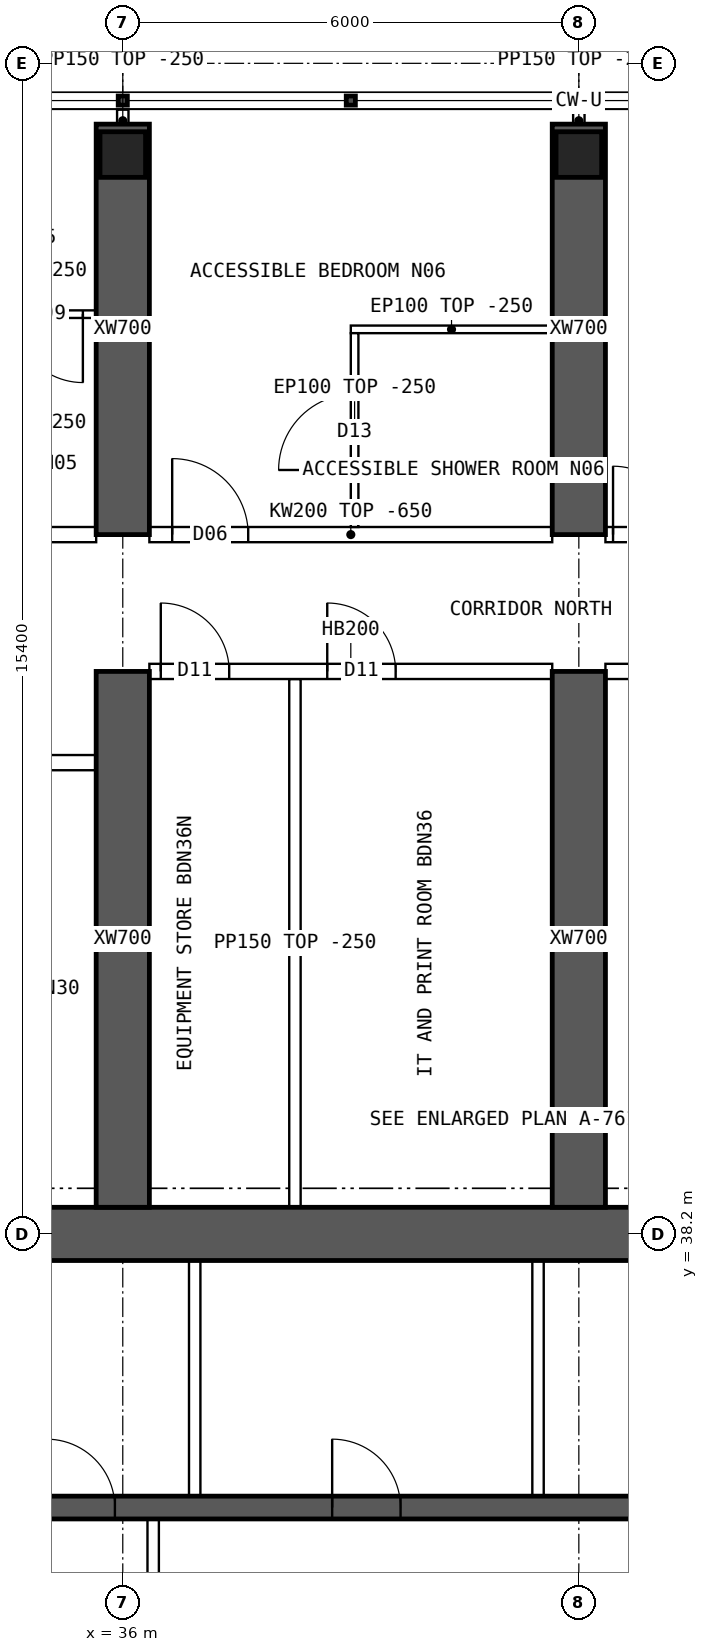
"""IFC4 building model, lengths in metres.
Left out: names, types, materials, properties, quantities, classifications, styles, units other than length and angle.
Written with IfcOpenShell. Run it as: python <this file> out.ifc"""

import sys

from ifc_helpers import new_model, si_unit, direction, frame, frame_2d, origin, origin_2d, place, context, subcontext, project, spatial, polyline, rectangle, hollow_rectangle, outline, extrude, element, fill, save


model = new_model("IFC4")
c1 = context("Model", 3, precision=1e-05, world=origin(), true_north=direction((0.0, 1.0)))
c2 = subcontext(c1, "Body", "Model", "MODEL_VIEW")
j1 = project(units=[si_unit("LENGTHUNIT", "METRE"), si_unit("PLANEANGLEUNIT", "RADIAN")], contexts=[c1])
p1 = place(None, origin())
s1 = spatial("IfcSite", under=j1, at=p1, CompositionType="ELEMENT")
p2 = place(p1, origin())
s2 = spatial("IfcBuilding", under=s1, at=p2, CompositionType="ELEMENT")
p3 = place(p2, frame((0.0, 0.0, 235.3)))
s3 = spatial("IfcBuildingStorey", under=s2, at=p3, CompositionType="ELEMENT", Elevation=235.3)
for number, where, z_axis, x_axis in (
    (1, (36.0, 52.4, 0.0), (0.0, 0.0, 1.0), (1.0, 0.0, 0.0)),
    (2, (42.0, 52.4, 0.0), (0.0, 0.0, 1.0), (1.0, 0.0, 0.0)),
):
    element("IfcColumn", number, at=place(p3, frame(where, z_axis=z_axis, x_axis=x_axis)), inside=s3, PredefinedType="COLUMN", context=c2, shape_type="SweptSolid", body=[
        extrude(hollow_rectangle(XDim=0.6, YDim=0.6, WallThickness=0.06, at=origin_2d()), origin(), (0.0, 0.0, 1.0), 3.75),
    ])
p4 = place(p3, frame((18.0, 38.2, 0.0), z_axis=(0.0, 0.0, 1.0), x_axis=(1.0, 0.0, 0.0)))
e3 = element("IfcWall", 3, at=p4, inside=s3, PredefinedType="SHEAR", context=c2, shape_type="SweptSolid", body=[
    extrude(rectangle(XDim=48.0, YDim=0.7, at=frame_2d((24.0, 0.0))), origin(), (0.0, 0.0, 1.0), 3.75),
])
p5 = place(p3, frame((18.35, 34.6, 0.0), z_axis=(0.0, 0.0, 1.0), x_axis=(1.0, 0.0, 0.0)))
e4 = element("IfcWall", 4, at=p5, inside=s3, PredefinedType="SHEAR", context=c2, shape_type="SweptSolid", body=[
    extrude(rectangle(XDim=47.3, YDim=0.3, at=frame_2d((23.65, 0.0))), origin(), (0.0, 0.0, 1.0), 3.75),
])
p6 = place(p5, frame((0.9, 0.0, 0.0)))
e5 = element("IfcOpeningElement", 5, at=p6, cuts=e4, PredefinedType="OPENING", context=c2, shape_type="SweptSolid", body=[
    extrude(rectangle(XDim=1.1, YDim=2.1, at=frame_2d((0.55, 1.05))), frame((0.0, 0.16, 0.0), z_axis=(0.0, -1.0, 0.0), x_axis=(1.0, 0.0, 0.0)), (0.0, 0.0, 1.0), 0.32),
])
p7 = place(p5, frame((45.3, 0.0, 0.0)))
e6 = element("IfcOpeningElement", 6, at=p7, cuts=e4, PredefinedType="OPENING", context=c2, shape_type="SweptSolid", body=[
    extrude(rectangle(XDim=1.1, YDim=2.1, at=frame_2d((0.55, 1.05))), frame((0.0, 0.16, 0.0), z_axis=(0.0, -1.0, 0.0), x_axis=(1.0, 0.0, 0.0)), (0.0, 0.0, 1.0), 0.32),
])
p8 = place(p5, frame((4.25, 0.0, 0.0)))
e7 = element("IfcOpeningElement", 7, at=p8, cuts=e4, PredefinedType="OPENING", context=c2, shape_type="SweptSolid", body=[
    extrude(rectangle(XDim=0.9, YDim=2.1, at=frame_2d((0.45, 1.05))), frame((0.0, 0.16, 0.0), z_axis=(0.0, -1.0, 0.0), x_axis=(1.0, 0.0, 0.0)), (0.0, 0.0, 1.0), 0.32),
])
p9 = place(p5, frame((42.15, 0.0, 0.0)))
e8 = element("IfcOpeningElement", 8, at=p9, cuts=e4, PredefinedType="OPENING", context=c2, shape_type="SweptSolid", body=[
    extrude(rectangle(XDim=0.9, YDim=2.1, at=frame_2d((0.45, 1.05))), frame((0.0, 0.16, 0.0), z_axis=(0.0, -1.0, 0.0), x_axis=(1.0, 0.0, 0.0)), (0.0, 0.0, 1.0), 0.32),
])
p10 = place(p5, frame((9.025, 0.0, 0.0)))
e9 = element("IfcOpeningElement", 9, at=p10, cuts=e4, PredefinedType="OPENING", context=c2, shape_type="SweptSolid", body=[
    extrude(rectangle(XDim=0.9, YDim=2.1, at=frame_2d((0.45, 1.05))), frame((0.0, 0.16, 0.0), z_axis=(0.0, -1.0, 0.0), x_axis=(1.0, 0.0, 0.0)), (0.0, 0.0, 1.0), 0.32),
])
p11 = place(p5, frame((12.999, 0.0, 0.0)))
e10 = element("IfcOpeningElement", 10, at=p11, cuts=e4, PredefinedType="OPENING", context=c2, shape_type="SweptSolid", body=[
    extrude(rectangle(XDim=0.9, YDim=2.1, at=frame_2d((0.45, 1.05))), frame((0.0, 0.16, 0.0), z_axis=(0.0, -1.0, 0.0), x_axis=(1.0, 0.0, 0.0)), (0.0, 0.0, 1.0), 0.32),
])
p12 = place(p5, frame((16.646, 0.0, 0.0)))
e11 = element("IfcOpeningElement", 11, at=p12, cuts=e4, PredefinedType="OPENING", context=c2, shape_type="SweptSolid", body=[
    extrude(rectangle(XDim=0.9, YDim=2.1, at=frame_2d((0.45, 1.05))), frame((0.0, 0.16, 0.0), z_axis=(0.0, -1.0, 0.0), x_axis=(1.0, 0.0, 0.0)), (0.0, 0.0, 1.0), 0.32),
])
p13 = place(p5, frame((20.405, 0.0, 0.0)))
e12 = element("IfcOpeningElement", 12, at=p13, cuts=e4, PredefinedType="OPENING", context=c2, shape_type="SweptSolid", body=[
    extrude(rectangle(XDim=0.9, YDim=2.1, at=frame_2d((0.45, 1.05))), frame((0.0, 0.16, 0.0), z_axis=(0.0, -1.0, 0.0), x_axis=(1.0, 0.0, 0.0)), (0.0, 0.0, 1.0), 0.32),
])
p14 = place(p5, frame((24.811, 0.0, 0.0)))
e13 = element("IfcOpeningElement", 13, at=p14, cuts=e4, PredefinedType="OPENING", context=c2, shape_type="SweptSolid", body=[
    extrude(rectangle(XDim=0.9, YDim=2.1, at=frame_2d((0.45, 1.05))), frame((0.0, 0.16, 0.0), z_axis=(0.0, -1.0, 0.0), x_axis=(1.0, 0.0, 0.0)), (0.0, 0.0, 1.0), 0.32),
])
p15 = place(p5, frame((27.608, 0.0, 0.0)))
e14 = element("IfcOpeningElement", 14, at=p15, cuts=e4, PredefinedType="OPENING", context=c2, shape_type="SweptSolid", body=[
    extrude(rectangle(XDim=0.9, YDim=2.1, at=frame_2d((0.45, 1.05))), frame((0.0, 0.16, 0.0), z_axis=(0.0, -1.0, 0.0), x_axis=(1.0, 0.0, 0.0)), (0.0, 0.0, 1.0), 0.32),
])
p16 = place(p5, frame((30.791, 0.0, 0.0)))
e15 = element("IfcOpeningElement", 15, at=p16, cuts=e4, PredefinedType="OPENING", context=c2, shape_type="SweptSolid", body=[
    extrude(rectangle(XDim=0.9, YDim=2.1, at=frame_2d((0.45, 1.05))), frame((0.0, 0.16, 0.0), z_axis=(0.0, -1.0, 0.0), x_axis=(1.0, 0.0, 0.0)), (0.0, 0.0, 1.0), 0.32),
])
p17 = place(p5, frame((34.742, 0.0, 0.0)))
e16 = element("IfcOpeningElement", 16, at=p17, cuts=e4, PredefinedType="OPENING", context=c2, shape_type="SweptSolid", body=[
    extrude(rectangle(XDim=0.9, YDim=2.1, at=frame_2d((0.45, 1.05))), frame((0.0, 0.16, 0.0), z_axis=(0.0, -1.0, 0.0), x_axis=(1.0, 0.0, 0.0)), (0.0, 0.0, 1.0), 0.32),
])
p18 = place(p5, frame((37.68, 0.0, 0.0)))
e17 = element("IfcOpeningElement", 17, at=p18, cuts=e4, PredefinedType="OPENING", context=c2, shape_type="SweptSolid", body=[
    extrude(rectangle(XDim=0.9, YDim=2.1, at=frame_2d((0.45, 1.05))), frame((0.0, 0.16, 0.0), z_axis=(0.0, -1.0, 0.0), x_axis=(1.0, 0.0, 0.0)), (0.0, 0.0, 1.0), 0.32),
])
p19 = place(p3, frame((36.0, 47.4, 0.0), z_axis=(0.0, 0.0, 1.0), x_axis=(0.0, 1.0, 0.0)))
e18 = element("IfcWall", 18, at=p19, inside=s3, PredefinedType="SHEAR", context=c2, shape_type="SweptSolid", body=[
    extrude(rectangle(XDim=5.4, YDim=0.7, at=frame_2d((2.7, 0.0))), origin(), (0.0, 0.0, 1.0), 3.75),
])
p20 = place(p3, frame((36.0, 38.55, 0.0), z_axis=(0.0, 0.0, 1.0), x_axis=(0.0, 1.0, 0.0)))
e19 = element("IfcWall", 19, at=p20, inside=s3, PredefinedType="SHEAR", context=c2, shape_type="SweptSolid", body=[
    extrude(rectangle(XDim=7.05, YDim=0.7, at=frame_2d((3.525, 0.0))), origin(), (0.0, 0.0, 1.0), 3.75),
])
p21 = place(p3, frame((42.0, 47.4, 0.0), z_axis=(0.0, 0.0, 1.0), x_axis=(0.0, 1.0, 0.0)))
e20 = element("IfcWall", 20, at=p21, inside=s3, PredefinedType="SHEAR", context=c2, shape_type="SweptSolid", body=[
    extrude(rectangle(XDim=5.4, YDim=0.7, at=frame_2d((2.7, 0.0))), origin(), (0.0, 0.0, 1.0), 3.75),
])
p22 = place(p3, frame((42.0, 38.55, 0.0), z_axis=(0.0, 0.0, 1.0), x_axis=(0.0, 1.0, 0.0)))
e21 = element("IfcWall", 21, at=p22, inside=s3, PredefinedType="SHEAR", context=c2, shape_type="SweptSolid", body=[
    extrude(rectangle(XDim=7.05, YDim=0.7, at=frame_2d((3.525, 0.0))), origin(), (0.0, 0.0, 1.0), 3.75),
])
p23 = place(p3, frame((36.4, 30.55, 0.0), z_axis=(0.0, 0.0, 1.0), x_axis=(0.0, 1.0, 0.0)))
e22 = element("IfcWall", 22, at=p23, inside=s3, PredefinedType="SOLIDWALL", context=c2, shape_type="SweptSolid", body=[
    extrude(rectangle(XDim=3.9, YDim=0.15, at=frame_2d((1.95, 0.0))), origin(), (0.0, 0.0, 1.0), 3.5),
])
p24 = place(p23, frame((1.15, 0.0, 0.0)))
e23 = element("IfcOpeningElement", 23, at=p24, cuts=e22, PredefinedType="OPENING", context=c2, shape_type="SweptSolid", body=[
    extrude(rectangle(XDim=1.6, YDim=2.1, at=frame_2d((0.8, 1.05))), frame((0.0, 0.085, 0.0), z_axis=(0.0, -1.0, 0.0), x_axis=(1.0, 0.0, 0.0)), (0.0, 0.0, 1.0), 0.17),
])
for number, where, z_axis, x_axis in (
    (24, (36.946, 34.75, 0.0), (0.0, 0.0, 1.0), (0.0, 1.0, 0.0)),
    (25, (41.463, 34.75, 0.0), (0.0, 0.0, 1.0), (0.0, 1.0, 0.0)),
):
    element("IfcWall", number, at=place(p3, frame(where, z_axis=z_axis, x_axis=x_axis)), inside=s3, PredefinedType="SOLIDWALL", context=c2, shape_type="SweptSolid", body=[
        extrude(rectangle(XDim=3.1, YDim=0.15, at=frame_2d((1.55, 0.0))), origin(), (0.0, 0.0, 1.0), 3.5),
    ])
p25 = place(p3, frame((30.35, 47.4, 0.0), z_axis=(0.0, 0.0, 1.0), x_axis=(1.0, 0.0, 0.0)))
e26 = element("IfcWall", 26, at=p25, inside=s3, PredefinedType="SOLIDWALL", context=c2, shape_type="SweptSolid", body=[
    extrude(outline(polyline([(0.0, 0.0), (5.3, 0.0), (5.3, 3.1), (0.0, 3.1), (0.0, 0.0)])), frame((0.0, 0.1, 0.0), z_axis=(0.0, -1.0, 0.0), x_axis=(1.0, 0.0, 0.0)), (0.0, 0.0, 1.0), 0.2),
])
p26 = place(p25, frame((0.3, 0.0, 0.0)))
e27 = element("IfcOpeningElement", 27, at=p26, cuts=e26, PredefinedType="OPENING", context=c2, shape_type="SweptSolid", body=[
    extrude(rectangle(XDim=0.9, YDim=2.1, at=frame_2d((0.45, 1.05))), frame((0.0, 0.11, 0.0), z_axis=(0.0, -1.0, 0.0), x_axis=(1.0, 0.0, 0.0)), (0.0, 0.0, 1.0), 0.22),
])
p27 = place(p3, frame((36.35, 47.4, 0.0), z_axis=(0.0, 0.0, 1.0), x_axis=(1.0, 0.0, 0.0)))
e28 = element("IfcWall", 28, at=p27, inside=s3, PredefinedType="SOLIDWALL", context=c2, shape_type="SweptSolid", body=[
    extrude(outline(polyline([(0.0, 0.0), (5.3, 0.0), (5.3, 3.1), (0.0, 3.1), (0.0, 0.0)])), frame((0.0, 0.1, 0.0), z_axis=(0.0, -1.0, 0.0), x_axis=(1.0, 0.0, 0.0)), (0.0, 0.0, 1.0), 0.2),
])
p28 = place(p27, frame((0.3, 0.0, 0.0)))
e29 = element("IfcOpeningElement", 29, at=p28, cuts=e28, PredefinedType="OPENING", context=c2, shape_type="SweptSolid", body=[
    extrude(rectangle(XDim=1.0, YDim=2.1, at=frame_2d((0.5, 1.05))), frame((0.0, 0.11, 0.0), z_axis=(0.0, -1.0, 0.0), x_axis=(1.0, 0.0, 0.0)), (0.0, 0.0, 1.0), 0.22),
])
p29 = place(p3, frame((36.35, 45.6, 0.0), z_axis=(0.0, 0.0, 1.0), x_axis=(1.0, 0.0, 0.0)))
e30 = element("IfcWall", 30, at=p29, inside=s3, PredefinedType="SOLIDWALL", context=c2, shape_type="SweptSolid", body=[
    extrude(rectangle(XDim=5.3, YDim=0.2, at=frame_2d((2.65, 0.0))), origin(), (0.0, 0.0, 1.0), 3.5),
])
p30 = place(p29, frame((0.15, 0.0, 0.0)))
e31 = element("IfcOpeningElement", 31, at=p30, cuts=e30, PredefinedType="OPENING", context=c2, shape_type="SweptSolid", body=[
    extrude(rectangle(XDim=0.9, YDim=2.1, at=frame_2d((0.45, 1.05))), frame((0.0, 0.11, 0.0), z_axis=(0.0, -1.0, 0.0), x_axis=(1.0, 0.0, 0.0)), (0.0, 0.0, 1.0), 0.22),
])
p31 = place(p29, frame((2.34, 0.0, 0.0)))
e32 = element("IfcOpeningElement", 32, at=p31, cuts=e30, PredefinedType="OPENING", context=c2, shape_type="SweptSolid", body=[
    extrude(rectangle(XDim=0.9, YDim=2.1, at=frame_2d((0.45, 1.05))), frame((0.0, 0.11, 0.0), z_axis=(0.0, -1.0, 0.0), x_axis=(1.0, 0.0, 0.0)), (0.0, 0.0, 1.0), 0.22),
])
p32 = place(p3, frame((42.35, 47.4, 0.0), z_axis=(0.0, 0.0, 1.0), x_axis=(1.0, 0.0, 0.0)))
e33 = element("IfcWall", 33, at=p32, inside=s3, PredefinedType="SOLIDWALL", context=c2, shape_type="SweptSolid", body=[
    extrude(outline(polyline([(0.0, 0.0), (5.3, 0.0), (5.3, 3.1), (0.0, 3.1), (0.0, 0.0)])), frame((0.0, 0.1, 0.0), z_axis=(0.0, -1.0, 0.0), x_axis=(1.0, 0.0, 0.0)), (0.0, 0.0, 1.0), 0.2),
])
p33 = place(p32, frame((0.1, 0.0, 0.0)))
e34 = element("IfcOpeningElement", 34, at=p33, cuts=e33, PredefinedType="OPENING", context=c2, shape_type="SweptSolid", body=[
    extrude(rectangle(XDim=0.9, YDim=2.1, at=frame_2d((0.45, 1.05))), frame((0.0, 0.11, 0.0), z_axis=(0.0, -1.0, 0.0), x_axis=(1.0, 0.0, 0.0)), (0.0, 0.0, 1.0), 0.22),
])
p34 = place(p3, frame((42.35, 45.6, 0.0), z_axis=(0.0, 0.0, 1.0), x_axis=(1.0, 0.0, 0.0)))
e35 = element("IfcWall", 35, at=p34, inside=s3, PredefinedType="SOLIDWALL", context=c2, shape_type="SweptSolid", body=[
    extrude(rectangle(XDim=5.3, YDim=0.2, at=frame_2d((2.65, 0.0))), origin(), (0.0, 0.0, 1.0), 3.5),
])
p35 = place(p34, frame((0.35, 0.0, 0.0)))
e36 = element("IfcOpeningElement", 36, at=p35, cuts=e35, PredefinedType="OPENING", context=c2, shape_type="SweptSolid", body=[
    extrude(rectangle(XDim=0.9, YDim=2.1, at=frame_2d((0.45, 1.05))), frame((0.0, 0.11, 0.0), z_axis=(0.0, -1.0, 0.0), x_axis=(1.0, 0.0, 0.0)), (0.0, 0.0, 1.0), 0.22),
])
p36 = place(p34, frame((2.565, 0.0, 0.0)))
e37 = element("IfcOpeningElement", 37, at=p36, cuts=e35, PredefinedType="OPENING", context=c2, shape_type="SweptSolid", body=[
    extrude(rectangle(XDim=0.9, YDim=2.1, at=frame_2d((0.45, 1.05))), frame((0.0, 0.11, 0.0), z_axis=(0.0, -1.0, 0.0), x_axis=(1.0, 0.0, 0.0)), (0.0, 0.0, 1.0), 0.22),
])
p37 = place(p3, frame((34.4, 50.3, 0.0), z_axis=(0.0, 0.0, 1.0), x_axis=(1.0, 0.0, 0.0)))
e38 = element("IfcWall", 38, at=p37, inside=s3, PredefinedType="PARTITIONING", context=c2, shape_type="SweptSolid", body=[
    extrude(rectangle(XDim=1.25, YDim=0.1, at=frame_2d((0.625, 0.0))), origin(), (0.0, 0.0, 1.0), 3.5),
])
p38 = place(p37, frame((0.175, 0.0, 0.0)))
e39 = element("IfcOpeningElement", 39, at=p38, cuts=e38, PredefinedType="OPENING", context=c2, shape_type="SweptSolid", body=[
    extrude(rectangle(XDim=0.9, YDim=2.1, at=frame_2d((0.45, 1.05))), frame((0.0, 0.06, 0.0), z_axis=(0.0, -1.0, 0.0), x_axis=(1.0, 0.0, 0.0)), (0.0, 0.0, 1.0), 0.12),
])
p39 = place(p3, frame((39.0, 50.1, 0.0), z_axis=(0.0, 0.0, 1.0), x_axis=(1.0, 0.0, 0.0)))
e40 = element("IfcWall", 40, at=p39, inside=s3, PredefinedType="PARTITIONING", context=c2, shape_type="SweptSolid", body=[
    extrude(rectangle(XDim=2.65, YDim=0.1, at=frame_2d((1.325, 0.0))), origin(), (0.0, 0.0, 1.0), 3.5),
])
p40 = place(p3, frame((39.05, 50.05, 0.0), z_axis=(0.0, 0.0, 1.0), x_axis=(0.0, -1.0, 0.0)))
e41 = element("IfcWall", 41, at=p40, inside=s3, PredefinedType="PARTITIONING", context=c2, shape_type="SweptSolid", body=[
    extrude(outline(polyline([(0.0, 0.0), (2.55, 0.0), (2.55, 3.1), (2.502, 3.1), (2.5, 3.5), (0.0, 3.5), (0.0, 0.0)])), frame((0.0, 0.05, 0.0), z_axis=(0.0, -1.0, 0.0), x_axis=(1.0, 0.0, 0.0)), (0.0, 0.0, 1.0), 0.1),
])
p41 = place(p40, frame((0.8, 0.0, 0.0)))
e42 = element("IfcOpeningElement", 42, at=p41, cuts=e41, PredefinedType="OPENING", context=c2, shape_type="SweptSolid", body=[
    extrude(rectangle(XDim=1.0, YDim=2.1, at=frame_2d((0.5, 1.05))), frame((0.0, 0.06, 0.0), z_axis=(0.0, -1.0, 0.0), x_axis=(1.0, 0.0, 0.0)), (0.0, 0.0, 1.0), 0.12),
])
p42 = place(p3, frame((30.35, 44.4, 0.0), z_axis=(0.0, 0.0, 1.0), x_axis=(1.0, 0.0, 0.0)))
e43 = element("IfcWall", 43, at=p42, inside=s3, PredefinedType="SOLIDWALL", context=c2, shape_type="SweptSolid", body=[
    extrude(rectangle(XDim=5.3, YDim=0.2, at=frame_2d((2.65, 0.0))), origin(), (0.0, 0.0, 1.0), 3.5),
])
p43 = place(p42, frame((0.8, 0.0, 0.0)))
e44 = element("IfcOpeningElement", 44, at=p43, cuts=e43, PredefinedType="OPENING", context=c2, shape_type="SweptSolid", body=[
    extrude(rectangle(XDim=1.0, YDim=2.1, at=frame_2d((0.5, 1.05))), frame((0.0, 0.11, 0.0), z_axis=(0.0, -1.0, 0.0), x_axis=(1.0, 0.0, 0.0)), (0.0, 0.0, 1.0), 0.22),
])
p44 = place(p3, frame((38.265, 38.55, 0.0), z_axis=(0.0, 0.0, 1.0), x_axis=(0.0, 1.0, 0.0)))
e45 = element("IfcWall", 45, at=p44, inside=s3, PredefinedType="PARTITIONING", context=c2, shape_type="SweptSolid", body=[
    extrude(rectangle(XDim=6.95, YDim=0.15, at=frame_2d((3.475, 0.0))), origin(), (0.0, 0.0, 1.0), 3.5),
])
for number, where, z_axis, x_axis in (
    (46, (36.0, 52.7, 0.0), (0.0, 0.0, 1.0), (0.0, 1.0, 0.0)),
    (47, (42.0, 52.7, 0.0), (0.0, 0.0, 1.0), (0.0, 1.0, 0.0)),
):
    element("IfcWall", number, at=place(p3, frame(where, z_axis=z_axis, x_axis=x_axis)), inside=s3, PredefinedType="PARTITIONING", context=c2, shape_type="SweptSolid", body=[
        extrude(rectangle(XDim=0.29, YDim=0.15, at=frame_2d((0.145, 0.0))), origin(), (0.0, 0.0, 1.0), 3.5),
    ])
p45 = place(p12, origin())
e48 = element("IfcDoor", 48, at=p45, inside=s3, OperationType="SINGLE_SWING_LEFT", PredefinedType="DOOR", context=c2, shape_type="SweptSolid", body=[
    extrude(rectangle(XDim=0.9, YDim=2.1, at=frame_2d((0.45, 1.05))), frame((0.0, 0.025, 0.0), z_axis=(0.0, -1.0, 0.0), x_axis=(1.0, 0.0, 0.0)), (0.0, 0.0, 1.0), 0.05),
])
fill(e11, e48)
p46 = place(p13, origin())
e49 = element("IfcDoor", 49, at=p46, inside=s3, OperationType="SINGLE_SWING_LEFT", PredefinedType="DOOR", context=c2, shape_type="SweptSolid", body=[
    extrude(rectangle(XDim=0.9, YDim=2.1, at=frame_2d((0.45, 1.05))), frame((0.0, 0.025, 0.0), z_axis=(0.0, -1.0, 0.0), x_axis=(1.0, 0.0, 0.0)), (0.0, 0.0, 1.0), 0.05),
])
fill(e12, e49)
p47 = place(p38, origin())
e50 = element("IfcDoor", 50, at=p47, inside=s3, OperationType="SINGLE_SWING_RIGHT", PredefinedType="DOOR", context=c2, shape_type="SweptSolid", body=[
    extrude(rectangle(XDim=0.9, YDim=2.1, at=frame_2d((0.45, 1.05))), frame((0.0, 0.025, 0.0), z_axis=(0.0, -1.0, 0.0), x_axis=(1.0, 0.0, 0.0)), (0.0, 0.0, 1.0), 0.05),
])
fill(e39, e50)
p48 = place(p41, origin())
e51 = element("IfcDoor", 51, at=p48, inside=s3, OperationType="SINGLE_SWING_RIGHT", PredefinedType="DOOR", context=c2, shape_type="SweptSolid", body=[
    extrude(rectangle(XDim=1.0, YDim=2.1, at=frame_2d((0.5, 1.05))), frame((0.0, 0.025, 0.0), z_axis=(0.0, -1.0, 0.0), x_axis=(1.0, 0.0, 0.0)), (0.0, 0.0, 1.0), 0.05),
])
fill(e42, e51)
p49 = place(p28, origin())
e52 = element("IfcDoor", 52, at=p49, inside=s3, OperationType="SINGLE_SWING_LEFT", PredefinedType="DOOR", context=c2, shape_type="SweptSolid", body=[
    extrude(rectangle(XDim=1.0, YDim=2.1, at=frame_2d((0.5, 1.05))), frame((0.0, 0.025, 0.0), z_axis=(0.0, -1.0, 0.0), x_axis=(1.0, 0.0, 0.0)), (0.0, 0.0, 1.0), 0.05),
])
fill(e29, e52)
p50 = place(p33, origin())
e53 = element("IfcDoor", 53, at=p50, inside=s3, OperationType="SINGLE_SWING_LEFT", PredefinedType="DOOR", context=c2, shape_type="SweptSolid", body=[
    extrude(rectangle(XDim=0.9, YDim=2.1, at=frame_2d((0.45, 1.05))), frame((0.0, 0.025, 0.0), z_axis=(0.0, -1.0, 0.0), x_axis=(1.0, 0.0, 0.0)), (0.0, 0.0, 1.0), 0.05),
])
fill(e34, e53)
p51 = place(p30, origin())
e54 = element("IfcDoor", 54, at=p51, inside=s3, OperationType="SINGLE_SWING_LEFT", PredefinedType="DOOR", context=c2, shape_type="SweptSolid", body=[
    extrude(rectangle(XDim=0.9, YDim=2.1, at=frame_2d((0.45, 1.05))), frame((0.0, 0.025, 0.0), z_axis=(0.0, -1.0, 0.0), x_axis=(1.0, 0.0, 0.0)), (0.0, 0.0, 1.0), 0.05),
])
fill(e31, e54)
p52 = place(p31, origin())
e55 = element("IfcDoor", 55, at=p52, inside=s3, OperationType="SINGLE_SWING_LEFT", PredefinedType="DOOR", context=c2, shape_type="SweptSolid", body=[
    extrude(rectangle(XDim=0.9, YDim=2.1, at=frame_2d((0.45, 1.05))), frame((0.0, 0.025, 0.0), z_axis=(0.0, -1.0, 0.0), x_axis=(1.0, 0.0, 0.0)), (0.0, 0.0, 1.0), 0.05),
])
fill(e32, e55)
save(model, sys.argv[1])
